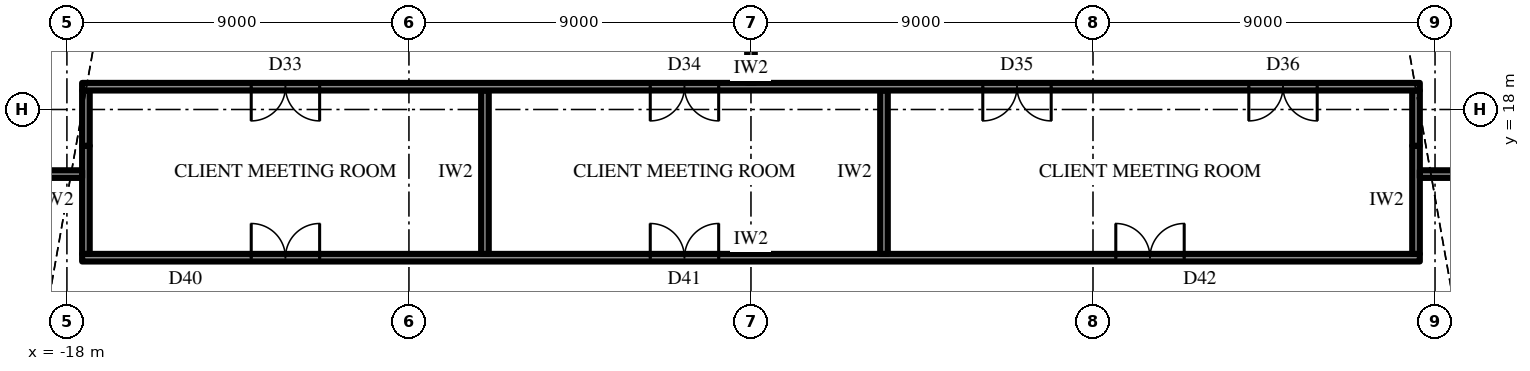
"""IFC4 building model, lengths in metres.
Left out: names, types, materials, properties, quantities, classifications, styles, units other than length and angle.
Written with IfcOpenShell. Run it as: python <this file> out.ifc"""

import sys

from ifc_helpers import new_model, si_unit, direction, frame, frame_2d, origin, place, context, subcontext, project, spatial, rectangle, extrude, element, fill, save


model = new_model("IFC4")
c1 = context("Model", 3, precision=1e-05, world=origin(), true_north=direction((0.0, 1.0)))
c2 = subcontext(c1, "Body", "Model", "MODEL_VIEW")
j1 = project(units=[si_unit("LENGTHUNIT", "METRE"), si_unit("PLANEANGLEUNIT", "RADIAN")], contexts=[c1])
p1 = place(None, origin())
s1 = spatial("IfcSite", under=j1, at=p1, CompositionType="ELEMENT")
p2 = place(p1, origin())
s2 = spatial("IfcBuilding", under=s1, at=p2, CompositionType="ELEMENT")
p3 = place(p2, frame((0.0, 0.0, 210.5)))
s3 = spatial("IfcBuildingStorey", under=s2, at=p3, CompositionType="ELEMENT", Elevation=210.5)
p4 = place(p3, frame((-17.6, 14.1, 0.0), z_axis=(0.0, 0.0, 1.0), x_axis=(1.0, 0.0, 0.0)))
e1 = element("IfcWall", 1, at=p4, inside=s3, PredefinedType="PARTITIONING", context=c2, shape_type="SweptSolid", body=[
    extrude(rectangle(XDim=35.2, YDim=0.2, at=frame_2d((17.6, 0.0))), origin(), (0.0, 0.0, 1.0), 4.8),
])
p5 = place(p4, frame((4.45, 0.0, 0.0)))
e2 = element("IfcOpeningElement", 2, at=p5, cuts=e1, PredefinedType="OPENING", context=c2, shape_type="SweptSolid", body=[
    extrude(rectangle(XDim=1.8, YDim=2.4, at=frame_2d((0.9, 1.2))), frame((0.0, 0.11, 0.0), z_axis=(0.0, -1.0, 0.0), x_axis=(1.0, 0.0, 0.0)), (0.0, 0.0, 1.0), 0.22),
])
p6 = place(p4, frame((14.95, 0.0, 0.0)))
e3 = element("IfcOpeningElement", 3, at=p6, cuts=e1, PredefinedType="OPENING", context=c2, shape_type="SweptSolid", body=[
    extrude(rectangle(XDim=1.8, YDim=2.4, at=frame_2d((0.9, 1.2))), frame((0.0, 0.11, 0.0), z_axis=(0.0, -1.0, 0.0), x_axis=(1.0, 0.0, 0.0)), (0.0, 0.0, 1.0), 0.22),
])
p7 = place(p4, frame((27.2, 0.0, 0.0)))
e4 = element("IfcOpeningElement", 4, at=p7, cuts=e1, PredefinedType="OPENING", context=c2, shape_type="SweptSolid", body=[
    extrude(rectangle(XDim=1.8, YDim=2.4, at=frame_2d((0.9, 1.2))), frame((0.0, 0.11, 0.0), z_axis=(0.0, -1.0, 0.0), x_axis=(1.0, 0.0, 0.0)), (0.0, 0.0, 1.0), 0.22),
])
p8 = place(p3, frame((-17.5, 14.2, 0.0), z_axis=(0.0, 0.0, 1.0), x_axis=(0.0, 1.0, 0.0)))
e5 = element("IfcWall", 5, at=p8, inside=s3, PredefinedType="PARTITIONING", context=c2, shape_type="SweptSolid", body=[
    extrude(rectangle(XDim=2.844, YDim=0.2, at=frame_2d((1.422, 0.0))), origin(), (0.0, 0.0, 1.0), 4.8),
])
p9 = place(p3, frame((-17.5, 17.044, 0.0), z_axis=(0.0, 0.0, 1.0), x_axis=(0.0, 1.0, 0.0)))
e6 = element("IfcWall", 6, at=p9, inside=s3, PredefinedType="PARTITIONING", context=c2, shape_type="SweptSolid", body=[
    extrude(rectangle(XDim=1.456, YDim=0.2, at=frame_2d((0.728, 0.0))), origin(), (0.0, 0.0, 1.0), 3.744),
])
for number, where, z_axis, x_axis in (
    (7, (-7.0, 14.2, 0.0), (0.0, 0.0, 1.0), (0.0, 1.0, 0.0)),
    (8, (3.5, 14.2, 0.0), (0.0, 0.0, 1.0), (0.0, 1.0, 0.0)),
):
    element("IfcWall", number, at=place(p3, frame(where, z_axis=z_axis, x_axis=x_axis)), inside=s3, PredefinedType="PARTITIONING", context=c2, shape_type="SweptSolid", body=[
        extrude(rectangle(XDim=4.3, YDim=0.2, at=frame_2d((2.15, 0.0))), origin(), (0.0, 0.0, 1.0), 4.8),
    ])
p10 = place(p3, frame((17.5, 14.2, 0.0), z_axis=(0.0, 0.0, 1.0), x_axis=(0.0, 1.0, 0.0)))
e9 = element("IfcWall", 9, at=p10, inside=s3, PredefinedType="PARTITIONING", context=c2, shape_type="SweptSolid", body=[
    extrude(rectangle(XDim=2.844, YDim=0.2, at=frame_2d((1.422, 0.0))), origin(), (0.0, 0.0, 1.0), 4.8),
])
p11 = place(p3, frame((17.5, 17.044, 0.0), z_axis=(0.0, 0.0, 1.0), x_axis=(0.0, 1.0, 0.0)))
e10 = element("IfcWall", 10, at=p11, inside=s3, PredefinedType="PARTITIONING", context=c2, shape_type="SweptSolid", body=[
    extrude(rectangle(XDim=1.456, YDim=0.2, at=frame_2d((0.728, 0.0))), origin(), (0.0, 0.0, 1.0), 3.744),
])
p12 = place(p3, frame((-17.6, 18.6, 0.0), z_axis=(0.0, 0.0, 1.0), x_axis=(1.0, 0.0, 0.0)))
e11 = element("IfcWall", 11, at=p12, inside=s3, PredefinedType="PARTITIONING", context=c2, shape_type="SweptSolid", body=[
    extrude(rectangle(XDim=35.2, YDim=0.2, at=frame_2d((17.6, 0.0))), origin(), (0.0, 0.0, 1.0), 4.8),
])
p13 = place(p12, frame((4.45, 0.0, 0.0)))
e12 = element("IfcOpeningElement", 12, at=p13, cuts=e11, PredefinedType="OPENING", context=c2, shape_type="SweptSolid", body=[
    extrude(rectangle(XDim=1.8, YDim=2.4, at=frame_2d((0.9, 1.2))), frame((0.0, 0.11, 0.0), z_axis=(0.0, -1.0, 0.0), x_axis=(1.0, 0.0, 0.0)), (0.0, 0.0, 1.0), 0.22),
])
p14 = place(p12, frame((14.95, 0.0, 0.0)))
e13 = element("IfcOpeningElement", 13, at=p14, cuts=e11, PredefinedType="OPENING", context=c2, shape_type="SweptSolid", body=[
    extrude(rectangle(XDim=1.8, YDim=2.4, at=frame_2d((0.9, 1.2))), frame((0.0, 0.11, 0.0), z_axis=(0.0, -1.0, 0.0), x_axis=(1.0, 0.0, 0.0)), (0.0, 0.0, 1.0), 0.22),
])
p15 = place(p12, frame((23.7, 0.0, 0.0)))
e14 = element("IfcOpeningElement", 14, at=p15, cuts=e11, PredefinedType="OPENING", context=c2, shape_type="SweptSolid", body=[
    extrude(rectangle(XDim=1.8, YDim=2.4, at=frame_2d((0.9, 1.2))), frame((0.0, 0.11, 0.0), z_axis=(0.0, -1.0, 0.0), x_axis=(1.0, 0.0, 0.0)), (0.0, 0.0, 1.0), 0.22),
])
p16 = place(p12, frame((30.7, 0.0, 0.0)))
e15 = element("IfcOpeningElement", 15, at=p16, cuts=e11, PredefinedType="OPENING", context=c2, shape_type="SweptSolid", body=[
    extrude(rectangle(XDim=1.8, YDim=2.4, at=frame_2d((0.9, 1.2))), frame((0.0, 0.11, 0.0), z_axis=(0.0, -1.0, 0.0), x_axis=(1.0, 0.0, 0.0)), (0.0, 0.0, 1.0), 0.22),
])
for number, where, z_axis, x_axis in (
    (16, (17.6, 16.3, 0.0), (0.0, 0.0, 1.0), (1.0, 0.0, 0.0)),
    (17, (-17.6, 16.3, 0.0), (0.0, 0.0, 1.0), (-1.0, 0.0, 0.0)),
):
    element("IfcWall", number, at=place(p3, frame(where, z_axis=z_axis, x_axis=x_axis)), inside=s3, PredefinedType="PARTITIONING", context=c2, shape_type="SweptSolid", body=[
        extrude(rectangle(XDim=4.9, YDim=0.2, at=frame_2d((2.45, 0.0))), origin(), (0.0, 0.0, 1.0), 4.8),
    ])
p17 = place(p3, frame((0.0, 18.7, 0.0), z_axis=(0.0, 0.0, 1.0), x_axis=(0.0, 1.0, 0.0)))
e18 = element("IfcWall", 18, at=p17, inside=s3, PredefinedType="PARTITIONING", context=c2, shape_type="SweptSolid", body=[
    extrude(rectangle(XDim=10.11, YDim=0.2, at=frame_2d((5.055, 0.0))), origin(), (0.0, 0.0, 1.0), 3.792),
])
p18 = place(p13, frame((1.8, 0.0, 0.0), z_axis=(0.0, 0.0, 1.0), x_axis=(-1.0, 0.0, 0.0)))
e19 = element("IfcDoor", 19, at=p18, inside=s3, OperationType="DOUBLE_DOOR_SINGLE_SWING", PredefinedType="DOOR", context=c2, shape_type="SweptSolid", body=[
    extrude(rectangle(XDim=1.8, YDim=2.4, at=frame_2d((0.9, 1.2))), frame((0.0, 0.025, 0.0), z_axis=(0.0, -1.0, 0.0), x_axis=(1.0, 0.0, 0.0)), (0.0, 0.0, 1.0), 0.05),
])
fill(e12, e19)
p19 = place(p14, frame((1.8, 0.0, 0.0), z_axis=(0.0, 0.0, 1.0), x_axis=(-1.0, 0.0, 0.0)))
e20 = element("IfcDoor", 20, at=p19, inside=s3, OperationType="DOUBLE_DOOR_SINGLE_SWING", PredefinedType="DOOR", context=c2, shape_type="SweptSolid", body=[
    extrude(rectangle(XDim=1.8, YDim=2.4, at=frame_2d((0.9, 1.2))), frame((0.0, 0.025, 0.0), z_axis=(0.0, -1.0, 0.0), x_axis=(1.0, 0.0, 0.0)), (0.0, 0.0, 1.0), 0.05),
])
fill(e13, e20)
p20 = place(p15, frame((1.8, 0.0, 0.0), z_axis=(0.0, 0.0, 1.0), x_axis=(-1.0, 0.0, 0.0)))
e21 = element("IfcDoor", 21, at=p20, inside=s3, OperationType="DOUBLE_DOOR_SINGLE_SWING", PredefinedType="DOOR", context=c2, shape_type="SweptSolid", body=[
    extrude(rectangle(XDim=1.8, YDim=2.4, at=frame_2d((0.9, 1.2))), frame((0.0, 0.025, 0.0), z_axis=(0.0, -1.0, 0.0), x_axis=(1.0, 0.0, 0.0)), (0.0, 0.0, 1.0), 0.05),
])
fill(e14, e21)
p21 = place(p16, frame((1.8, 0.0, 0.0), z_axis=(0.0, 0.0, 1.0), x_axis=(-1.0, 0.0, 0.0)))
e22 = element("IfcDoor", 22, at=p21, inside=s3, OperationType="DOUBLE_DOOR_SINGLE_SWING", PredefinedType="DOOR", context=c2, shape_type="SweptSolid", body=[
    extrude(rectangle(XDim=1.8, YDim=2.4, at=frame_2d((0.9, 1.2))), frame((0.0, 0.025, 0.0), z_axis=(0.0, -1.0, 0.0), x_axis=(1.0, 0.0, 0.0)), (0.0, 0.0, 1.0), 0.05),
])
fill(e15, e22)
p22 = place(p5, origin())
e23 = element("IfcDoor", 23, at=p22, inside=s3, OperationType="DOUBLE_DOOR_SINGLE_SWING", PredefinedType="DOOR", context=c2, shape_type="SweptSolid", body=[
    extrude(rectangle(XDim=1.8, YDim=2.4, at=frame_2d((0.9, 1.2))), frame((0.0, 0.025, 0.0), z_axis=(0.0, -1.0, 0.0), x_axis=(1.0, 0.0, 0.0)), (0.0, 0.0, 1.0), 0.05),
])
fill(e2, e23)
p23 = place(p6, origin())
e24 = element("IfcDoor", 24, at=p23, inside=s3, OperationType="DOUBLE_DOOR_SINGLE_SWING", PredefinedType="DOOR", context=c2, shape_type="SweptSolid", body=[
    extrude(rectangle(XDim=1.8, YDim=2.4, at=frame_2d((0.9, 1.2))), frame((0.0, 0.025, 0.0), z_axis=(0.0, -1.0, 0.0), x_axis=(1.0, 0.0, 0.0)), (0.0, 0.0, 1.0), 0.05),
])
fill(e3, e24)
p24 = place(p7, origin())
e25 = element("IfcDoor", 25, at=p24, inside=s3, OperationType="DOUBLE_DOOR_SINGLE_SWING", PredefinedType="DOOR", context=c2, shape_type="SweptSolid", body=[
    extrude(rectangle(XDim=1.8, YDim=2.4, at=frame_2d((0.9, 1.2))), frame((0.0, 0.025, 0.0), z_axis=(0.0, -1.0, 0.0), x_axis=(1.0, 0.0, 0.0)), (0.0, 0.0, 1.0), 0.05),
])
fill(e4, e25)
save(model, sys.argv[1])
